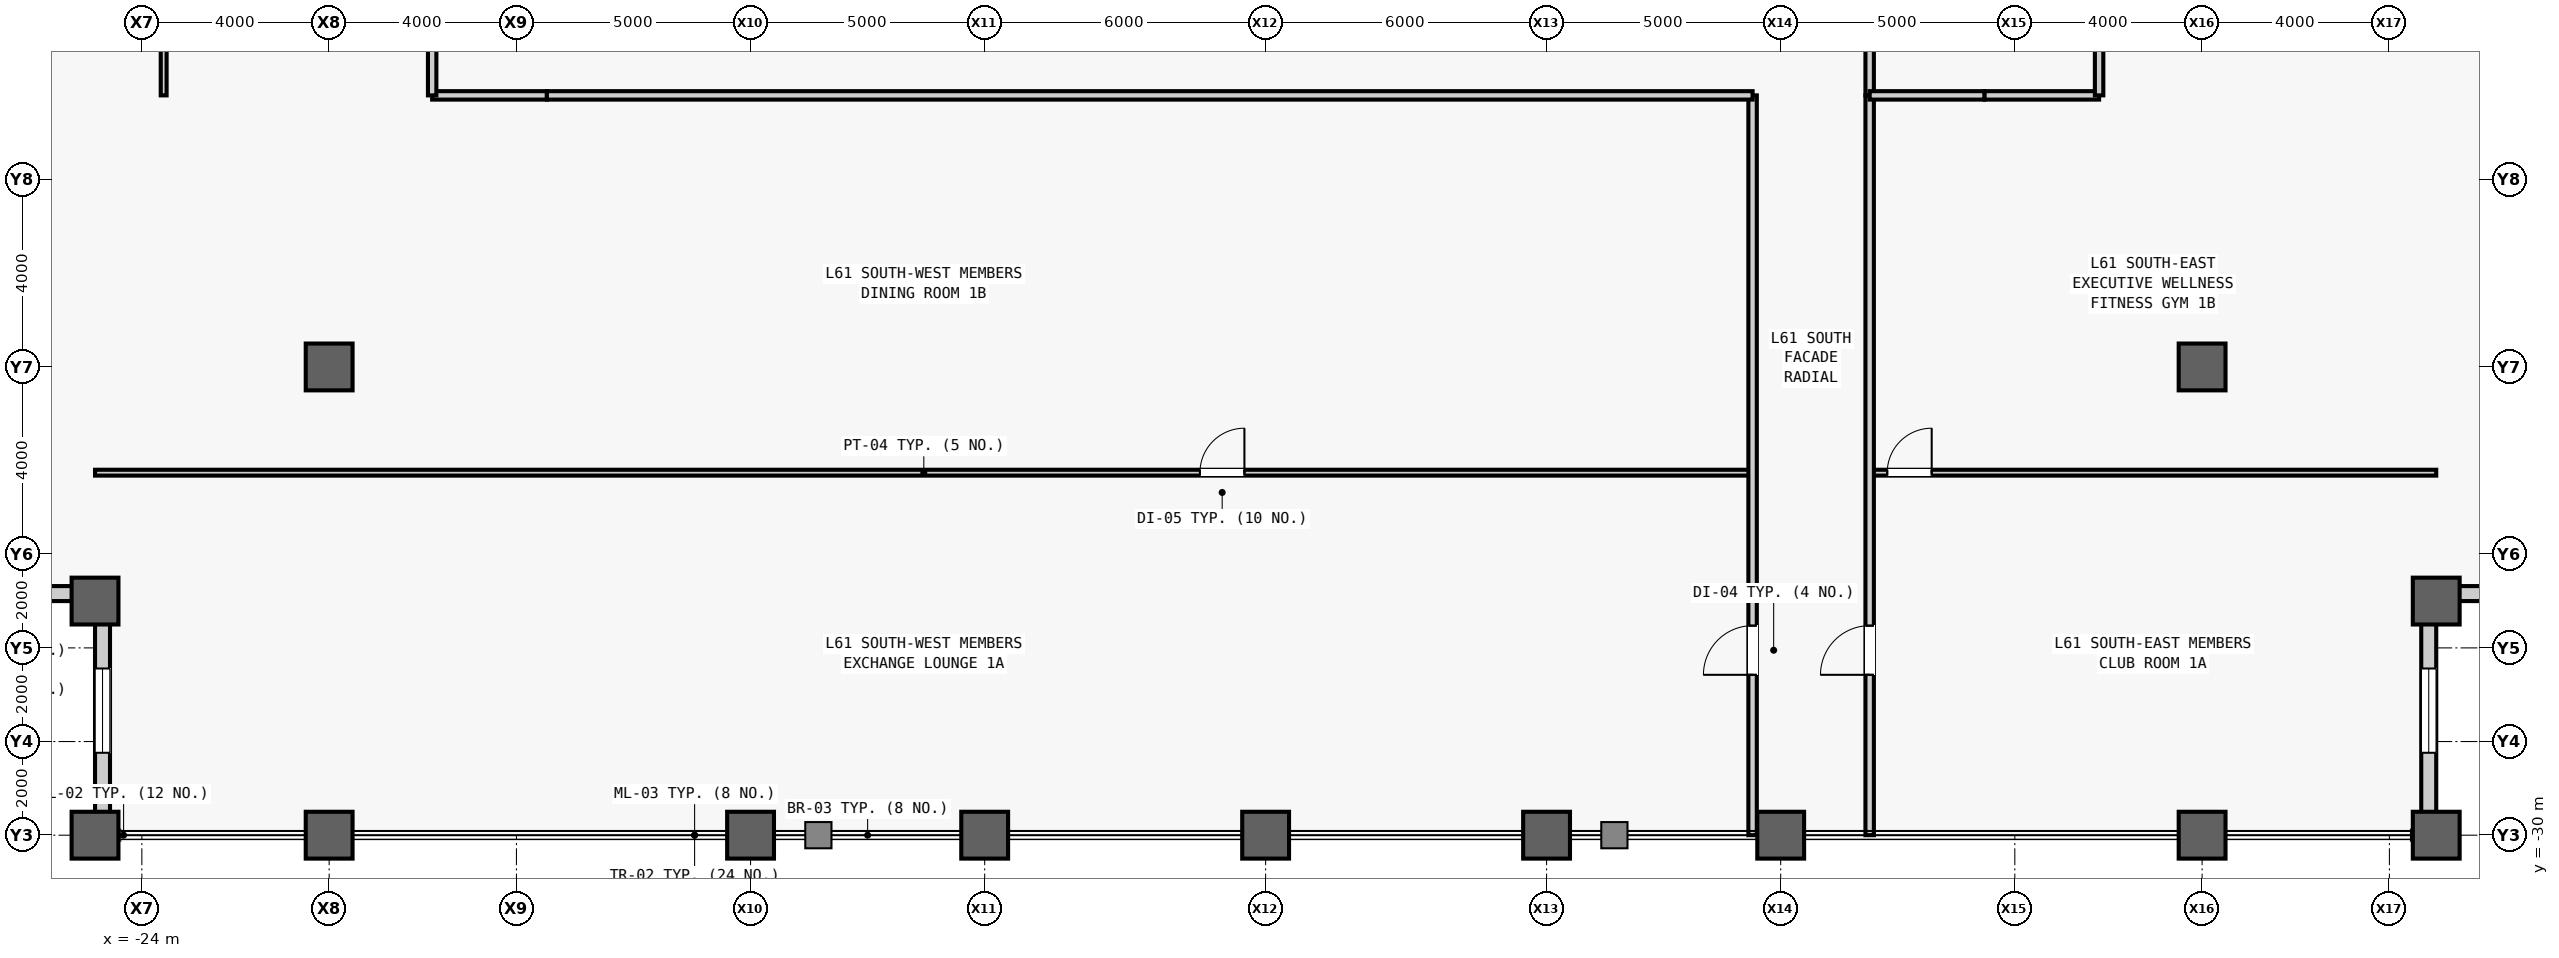
"""IFC4 building model, lengths in metres.
Left out: names, types, materials, properties, quantities, classifications, styles, units other than length and angle.
Written with IfcOpenShell. Run it as: python <this file> out.ifc"""

import sys

from ifc_helpers import new_model, si_unit, direction, frame, frame_2d, origin, origin_2d, place, context, subcontext, project, spatial, rectangle, hollow_rectangle, extrude, source, transform, mapped, element, fill, save


model = new_model("IFC4")
c1 = context("Model", 3, precision=1e-05, world=origin(), true_north=direction((0.0, 1.0)))
c2 = subcontext(c1, "Body", "Model", "MODEL_VIEW")
j1 = project(units=[si_unit("LENGTHUNIT", "METRE"), si_unit("PLANEANGLEUNIT", "RADIAN")], contexts=[c1])
p1 = place(None, origin())
s1 = spatial("IfcSite", under=j1, at=p1, CompositionType="ELEMENT")
p2 = place(p1, origin())
s2 = spatial("IfcBuilding", under=s1, at=p2, CompositionType="ELEMENT")
p3 = place(p2, frame((0.0, 0.0, 259.1)))
s3 = spatial("IfcBuildingStorey", under=s2, at=p3, CompositionType="ELEMENT", Elevation=259.1)
m1 = source(origin(), c2, "Body", "SweptSolid", [
    extrude(hollow_rectangle(XDim=1.0, YDim=1.0, WallThickness=0.055, at=origin_2d()), origin(), (0.0, 0.0, 1.0), 4.0),
])
for number, where, z_axis, x_axis in (
    (1, (-25.0, -30.0, 0.0), (0.0, 0.0, 1.0), (1.0, 0.0, 0.0)),
    (2, (-25.0, -25.0, 0.0), (0.0, 0.0, 1.0), (1.0, 0.0, 0.0)),
    (3, (-20.0, -30.0, 0.0), (0.0, 0.0, 1.0), (1.0, 0.0, 0.0)),
    (4, (-20.0, -20.0, 0.0), (0.0, 0.0, 1.0), (1.0, 0.0, 0.0)),
    (5, (-11.0, -30.0, 0.0), (0.0, 0.0, 1.0), (1.0, 0.0, 0.0)),
    (6, (-6.0, -30.0, 0.0), (0.0, 0.0, 1.0), (1.0, 0.0, 0.0)),
    (7, (0.0, -30.0, 0.0), (0.0, 0.0, 1.0), (1.0, 0.0, 0.0)),
    (8, (6.0, -30.0, 0.0), (0.0, 0.0, 1.0), (1.0, 0.0, 0.0)),
    (9, (11.0, -30.0, 0.0), (0.0, 0.0, 1.0), (1.0, 0.0, 0.0)),
    (10, (20.0, -30.0, 0.0), (0.0, 0.0, 1.0), (1.0, 0.0, 0.0)),
    (11, (20.0, -20.0, 0.0), (0.0, 0.0, 1.0), (1.0, 0.0, 0.0)),
    (12, (25.0, -30.0, 0.0), (0.0, 0.0, 1.0), (1.0, 0.0, 0.0)),
    (13, (25.0, -25.0, 0.0), (0.0, 0.0, 1.0), (1.0, 0.0, 0.0)),
):
    element("IfcColumn", number, at=place(p3, frame(where, z_axis=z_axis, x_axis=x_axis)), inside=s3, PredefinedType="COLUMN", context=c2, shape_type="MappedRepresentation", body=[
        mapped(m1, transform((0.0, 0.0, 0.0), scale=1.0)),
    ])
m2 = source(origin(), c2, "Body", "SweptSolid", [
    extrude(rectangle(XDim=4.68, YDim=0.32, at=frame_2d((2.34, 0.0))), origin(), (0.0, 0.0, 1.0), 3.164),
])
p4 = place(p3, frame((-25.0, -24.84, 0.0), z_axis=(0.0, 0.0, 1.0), x_axis=(-1.0, 0.0, 0.0)))
e14 = element("IfcWall", 14, at=p4, inside=s3, PredefinedType="STANDARD", context=c2, shape_type="MappedRepresentation", body=[
    mapped(m2, transform((0.0, 0.0, 0.0), scale=1.0)),
])
m3 = source(origin(), c2, "Body", "SweptSolid", [
    extrude(rectangle(XDim=1.8, YDim=2.4, at=frame_2d((0.9, 1.2))), frame((0.0, 0.17, 0.0), z_axis=(0.0, -1.0, 0.0), x_axis=(1.0, 0.0, 0.0)), (0.0, 0.0, 1.0), 0.34),
])
p5 = place(p4, frame((1.44, 0.0, 0.5)))
e15 = element("IfcOpeningElement", 15, at=p5, cuts=e14, PredefinedType="OPENING", context=c2, shape_type="MappedRepresentation", body=[
    mapped(m3, transform((0.0, 0.0, 0.0), scale=1.0)),
])
p6 = place(p3, frame((-24.84, -29.68, 0.0), z_axis=(0.0, 0.0, 1.0), x_axis=(0.0, 1.0, 0.0)))
e16 = element("IfcWall", 16, at=p6, inside=s3, PredefinedType="STANDARD", context=c2, shape_type="MappedRepresentation", body=[
    mapped(m2, transform((0.0, 0.0, 0.0), scale=1.0)),
])
p7 = place(p6, frame((1.44, 0.0, 0.5)))
e17 = element("IfcOpeningElement", 17, at=p7, cuts=e16, PredefinedType="OPENING", context=c2, shape_type="MappedRepresentation", body=[
    mapped(m3, transform((0.0, 0.0, 0.0), scale=1.0)),
])
p8 = place(p3, frame((24.84, -29.68, 0.0), z_axis=(0.0, 0.0, 1.0), x_axis=(0.0, 1.0, 0.0)))
e18 = element("IfcWall", 18, at=p8, inside=s3, PredefinedType="STANDARD", context=c2, shape_type="MappedRepresentation", body=[
    mapped(m2, transform((0.0, 0.0, 0.0), scale=1.0)),
])
p9 = place(p8, frame((1.44, 0.0, 0.5)))
e19 = element("IfcOpeningElement", 19, at=p9, cuts=e18, PredefinedType="OPENING", context=c2, shape_type="MappedRepresentation", body=[
    mapped(m3, transform((0.0, 0.0, 0.0), scale=1.0)),
])
p10 = place(p3, frame((25.0, -24.84, 0.0), z_axis=(0.0, 0.0, 1.0), x_axis=(1.0, 0.0, 0.0)))
e20 = element("IfcWall", 20, at=p10, inside=s3, PredefinedType="STANDARD", context=c2, shape_type="MappedRepresentation", body=[
    mapped(m2, transform((0.0, 0.0, 0.0), scale=1.0)),
])
p11 = place(p10, frame((1.44, 0.0, 0.5)))
e21 = element("IfcOpeningElement", 21, at=p11, cuts=e20, PredefinedType="OPENING", context=c2, shape_type="MappedRepresentation", body=[
    mapped(m3, transform((0.0, 0.0, 0.0), scale=1.0)),
])
m4 = source(origin(), c2, "Body", "SweptSolid", [
    extrude(rectangle(XDim=2.45, YDim=0.18, at=frame_2d((1.225, 0.0))), origin(), (0.0, 0.0, 1.0), 3.78),
])
for number, where, z_axis, x_axis in (
    (22, (15.35, -14.2, 0.0), (0.0, 0.0, 1.0), (1.0, 0.0, 0.0)),
    (23, (-17.8, -14.2, 0.0), (0.0, 0.0, 1.0), (1.0, 0.0, 0.0)),
):
    element("IfcWall", number, at=place(p3, frame(where, z_axis=z_axis, x_axis=x_axis)), inside=s3, PredefinedType="PARTITIONING", context=c2, shape_type="MappedRepresentation", body=[
        mapped(m4, transform((0.0, 0.0, 0.0), scale=1.0)),
    ])
m5 = source(origin(), c2, "Body", "SweptSolid", [
    extrude(rectangle(XDim=3.2, YDim=0.18, at=frame_2d((1.6, 0.0))), origin(), (0.0, 0.0, 1.0), 3.78),
])
p12 = place(p3, frame((12.9, -14.2, 0.0), z_axis=(0.0, 0.0, 1.0), x_axis=(0.0, 1.0, 0.0)))
e24 = element("IfcWall", 24, at=p12, inside=s3, PredefinedType="PARTITIONING", context=c2, shape_type="MappedRepresentation", body=[
    mapped(m5, transform((0.0, 0.0, 0.0), scale=1.0)),
])
m6 = source(origin(), c2, "Body", "SweptSolid", [
    extrude(rectangle(XDim=35.4, YDim=0.125, at=frame_2d((17.7, 0.0))), origin(), (0.0, 0.0, 1.0), 3.78),
])
p13 = place(p3, frame((-25.0, -22.258, 0.0), z_axis=(0.0, 0.0, 1.0), x_axis=(1.0, 0.0, 0.0)))
e25 = element("IfcWall", 25, at=p13, inside=s3, PredefinedType="PARTITIONING", context=c2, shape_type="MappedRepresentation", body=[
    mapped(m6, transform((0.0, 0.0, 0.0), scale=1.0)),
])
m7 = source(origin(), c2, "Body", "SweptSolid", [
    extrude(rectangle(XDim=0.95, YDim=2.15, at=frame_2d((0.475, 1.075))), frame((0.0, 0.073, 0.0), z_axis=(0.0, -1.0, 0.0), x_axis=(1.0, 0.0, 0.0)), (0.0, 0.0, 1.0), 0.145),
])
p14 = place(p13, frame((23.597, 0.0, 0.0)))
e26 = element("IfcOpeningElement", 26, at=p14, cuts=e25, PredefinedType="OPENING", context=c2, shape_type="MappedRepresentation", body=[
    mapped(m7, transform((0.0, 0.0, 0.0), scale=1.0)),
])
m8 = source(origin(), c2, "Body", "SweptSolid", [
    extrude(rectangle(XDim=15.8, YDim=0.18, at=frame_2d((7.9, 0.0))), origin(), (0.0, 0.0, 1.0), 3.78),
])
p15 = place(p3, frame((10.4, -30.0, 0.0), z_axis=(0.0, 0.0, 1.0), x_axis=(0.0, 1.0, 0.0)))
e27 = element("IfcWall", 27, at=p15, inside=s3, PredefinedType="PARTITIONING", context=c2, shape_type="MappedRepresentation", body=[
    mapped(m8, transform((0.0, 0.0, 0.0), scale=1.0)),
])
m9 = source(origin(), c2, "Body", "SweptSolid", [
    extrude(rectangle(XDim=1.05, YDim=2.2, at=frame_2d((0.525, 1.1))), frame((0.0, 0.1, 0.0), z_axis=(0.0, -1.0, 0.0), x_axis=(1.0, 0.0, 0.0)), (0.0, 0.0, 1.0), 0.2),
])
p16 = place(p15, frame((3.425, 0.0, 0.0)))
e28 = element("IfcOpeningElement", 28, at=p16, cuts=e27, PredefinedType="OPENING", context=c2, shape_type="MappedRepresentation", body=[
    mapped(m9, transform((0.0, 0.0, 0.0), scale=1.0)),
])
m10 = source(origin(), c2, "Body", "SweptSolid", [
    extrude(rectangle(XDim=25.75, YDim=0.18, at=frame_2d((12.875, 0.0))), origin(), (0.0, 0.0, 1.0), 3.78),
])
p17 = place(p3, frame((-15.35, -14.2, 0.0), z_axis=(0.0, 0.0, 1.0), x_axis=(1.0, 0.0, 0.0)))
e29 = element("IfcWall", 29, at=p17, inside=s3, PredefinedType="PARTITIONING", context=c2, shape_type="MappedRepresentation", body=[
    mapped(m10, transform((0.0, 0.0, 0.0), scale=1.0)),
])
m11 = source(origin(), c2, "Body", "SweptSolid", [
    extrude(rectangle(XDim=12.1, YDim=0.125, at=frame_2d((6.05, 0.0))), origin(), (0.0, 0.0, 1.0), 3.78),
])
p18 = place(p3, frame((12.9, -22.258, 0.0), z_axis=(0.0, 0.0, 1.0), x_axis=(1.0, 0.0, 0.0)))
e30 = element("IfcWall", 30, at=p18, inside=s3, PredefinedType="PARTITIONING", context=c2, shape_type="MappedRepresentation", body=[
    mapped(m11, transform((0.0, 0.0, 0.0), scale=1.0)),
])
p19 = place(p18, frame((0.375, 0.0, 0.0)))
e31 = element("IfcOpeningElement", 31, at=p19, cuts=e30, PredefinedType="OPENING", context=c2, shape_type="MappedRepresentation", body=[
    mapped(m7, transform((0.0, 0.0, 0.0), scale=1.0)),
])
p20 = place(p3, frame((12.9, -30.0, 0.0), z_axis=(0.0, 0.0, 1.0), x_axis=(0.0, 1.0, 0.0)))
e32 = element("IfcWall", 32, at=p20, inside=s3, PredefinedType="PARTITIONING", context=c2, shape_type="MappedRepresentation", body=[
    mapped(m8, transform((0.0, 0.0, 0.0), scale=1.0)),
])
p21 = place(p20, frame((3.425, 0.0, 0.0)))
e33 = element("IfcOpeningElement", 33, at=p21, cuts=e32, PredefinedType="OPENING", context=c2, shape_type="MappedRepresentation", body=[
    mapped(m9, transform((0.0, 0.0, 0.0), scale=1.0)),
])
m12 = source(origin(), c2, "Body", "SweptSolid", [
    extrude(rectangle(XDim=2.45, YDim=0.18, at=frame_2d((1.225, 0.0))), origin(), (0.0, 0.0, 1.0), 3.78),
])
p22 = place(p3, frame((12.9, -14.2, 0.0), z_axis=(0.0, 0.0, 1.0), x_axis=(1.0, 0.0, 0.0)))
e34 = element("IfcWall", 34, at=p22, inside=s3, PredefinedType="PARTITIONING", context=c2, shape_type="MappedRepresentation", body=[
    mapped(m12, transform((0.0, 0.0, 0.0), scale=1.0)),
])
m13 = source(origin(), c2, "Body", "SweptSolid", [
    extrude(rectangle(XDim=17.45, YDim=0.125, at=frame_2d((8.725, 0.0))), origin(), (0.0, 0.0, 1.0), 3.78),
])
p23 = place(p3, frame((-23.534, -14.2, 0.0), z_axis=(0.0, 0.0, 1.0), x_axis=(0.0, 1.0, 0.0)))
e35 = element("IfcWall", 35, at=p23, inside=s3, PredefinedType="PARTITIONING", context=c2, shape_type="MappedRepresentation", body=[
    mapped(m13, transform((0.0, 0.0, 0.0), scale=1.0)),
])
m14 = source(origin(), c2, "Body", "SweptSolid", [
    extrude(rectangle(XDim=17.45, YDim=0.18, at=frame_2d((8.725, 0.0))), origin(), (0.0, 0.0, 1.0), 3.78),
])
p24 = place(p3, frame((-17.8, -14.2, 0.0), z_axis=(0.0, 0.0, 1.0), x_axis=(0.0, 1.0, 0.0)))
e36 = element("IfcWall", 36, at=p24, inside=s3, PredefinedType="PARTITIONING", context=c2, shape_type="MappedRepresentation", body=[
    mapped(m14, transform((0.0, 0.0, 0.0), scale=1.0)),
])
m15 = source(origin(), c2, "Body", "SweptSolid", [
    extrude(rectangle(XDim=10.55, YDim=0.18, at=frame_2d((5.275, 0.0))), origin(), (0.0, 0.0, 1.0), 3.78),
])
p25 = place(p3, frame((17.8, -14.2, 0.0), z_axis=(0.0, 0.0, 1.0), x_axis=(0.0, 1.0, 0.0)))
e37 = element("IfcWall", 37, at=p25, inside=s3, PredefinedType="PARTITIONING", context=c2, shape_type="MappedRepresentation", body=[
    mapped(m15, transform((0.0, 0.0, 0.0), scale=1.0)),
])
m16 = source(origin(), c2, "Body", "SweptSolid", [
    extrude(rectangle(XDim=1.8, YDim=2.4, at=frame_2d((0.9, 1.2))), frame((0.0, 0.03, 0.0), z_axis=(0.0, -1.0, 0.0), x_axis=(1.0, 0.0, 0.0)), (0.0, 0.0, 1.0), 0.06),
])
p26 = place(p7, origin())
e38 = element("IfcWindow", 38, at=p26, inside=s3, PartitioningType="SINGLE_PANEL", PredefinedType="WINDOW", context=c2, shape_type="MappedRepresentation", body=[
    mapped(m16, transform((0.0, 0.0, 0.0), scale=1.0)),
])
fill(e17, e38)
p27 = place(p9, origin())
e39 = element("IfcWindow", 39, at=p27, inside=s3, PartitioningType="SINGLE_PANEL", PredefinedType="WINDOW", context=c2, shape_type="MappedRepresentation", body=[
    mapped(m16, transform((0.0, 0.0, 0.0), scale=1.0)),
])
fill(e19, e39)
m17 = source(origin(), c2, "Body", "SweptSolid", [
    extrude(rectangle(XDim=0.95, YDim=2.15, at=frame_2d((0.475, 1.075))), frame((0.0, 0.025, 0.0), z_axis=(0.0, -1.0, 0.0), x_axis=(1.0, 0.0, 0.0)), (0.0, 0.0, 1.0), 0.05),
])
p28 = place(p14, origin())
e40 = element("IfcDoor", 40, at=p28, inside=s3, OperationType="SINGLE_SWING_RIGHT", PredefinedType="DOOR", context=c2, shape_type="MappedRepresentation", body=[
    mapped(m17, transform((0.0, 0.0, 0.0), scale=1.0)),
])
fill(e26, e40)
m18 = source(origin(), c2, "Body", "SweptSolid", [
    extrude(rectangle(XDim=1.05, YDim=2.2, at=frame_2d((0.525, 1.1))), frame((0.0, 0.025, 0.0), z_axis=(0.0, -1.0, 0.0), x_axis=(1.0, 0.0, 0.0)), (0.0, 0.0, 1.0), 0.05),
])
p29 = place(p16, origin())
e41 = element("IfcDoor", 41, at=p29, inside=s3, OperationType="SINGLE_SWING_LEFT", PredefinedType="DOOR", context=c2, shape_type="MappedRepresentation", body=[
    mapped(m18, transform((0.0, 0.0, 0.0), scale=1.0)),
])
fill(e28, e41)
p30 = place(p19, origin())
e42 = element("IfcDoor", 42, at=p30, inside=s3, OperationType="SINGLE_SWING_RIGHT", PredefinedType="DOOR", context=c2, shape_type="MappedRepresentation", body=[
    mapped(m17, transform((0.0, 0.0, 0.0), scale=1.0)),
])
fill(e31, e42)
p31 = place(p21, origin())
e43 = element("IfcDoor", 43, at=p31, inside=s3, OperationType="SINGLE_SWING_LEFT", PredefinedType="DOOR", context=c2, shape_type="MappedRepresentation", body=[
    mapped(m18, transform((0.0, 0.0, 0.0), scale=1.0)),
])
fill(e33, e43)
save(model, sys.argv[1])
